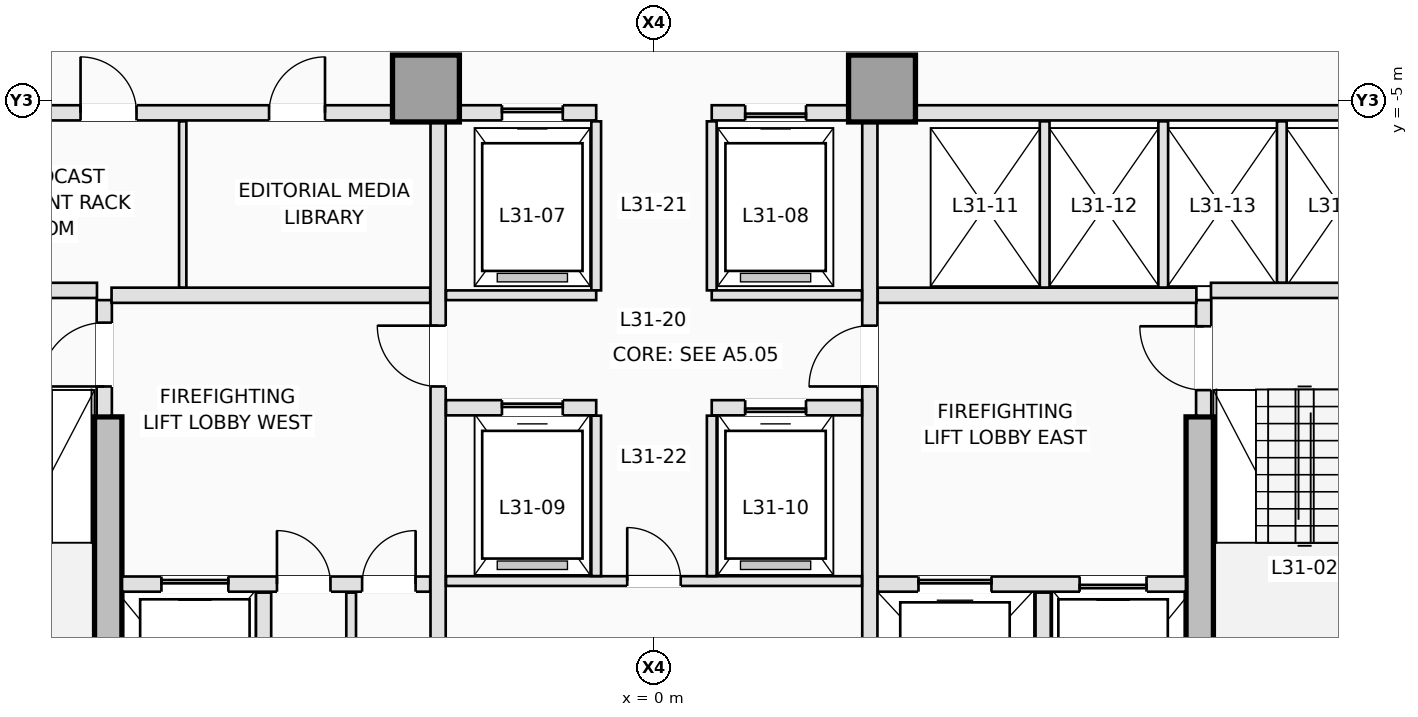
"""IFC4 building model, lengths in metres.
Left out: names, types, materials, properties, quantities, classifications, styles, units other than length and angle.
Written with IfcOpenShell. Run it as: python <this file> out.ifc"""

import sys

from ifc_helpers import new_model, si_unit, direction, frame, frame_2d, origin, origin_2d, place, context, subcontext, project, spatial, rectangle, extrude, element, fill, save


model = new_model("IFC4")
c1 = context("Model", 3, precision=1e-05, world=origin(), true_north=direction((0.0, 1.0)))
c2 = subcontext(c1, "Body", "Model", "MODEL_VIEW")
j1 = project(units=[si_unit("LENGTHUNIT", "METRE"), si_unit("PLANEANGLEUNIT", "RADIAN")], contexts=[c1])
p1 = place(None, origin())
s1 = spatial("IfcSite", under=j1, at=p1, CompositionType="ELEMENT")
p2 = place(p1, origin())
s2 = spatial("IfcBuilding", under=s1, at=p2, CompositionType="ELEMENT")
p3 = place(p2, frame((0.0, 0.0, 116.0)))
s3 = spatial("IfcBuildingStorey", under=s2, at=p3, CompositionType="ELEMENT", Elevation=116.0)
for number, where, z_axis, x_axis in (
    (1, (-8.975, -16.15, 0.0), (0.0, 0.0, 1.0), (0.0, 1.0, 0.0)),
    (2, (8.975, -16.15, 0.0), (0.0, 0.0, 1.0), (0.0, 1.0, 0.0)),
):
    element("IfcWall", number, at=place(p3, frame(where, z_axis=z_axis, x_axis=x_axis)), inside=s3, PredefinedType="SHEAR", context=c2, shape_type="SweptSolid", body=[
        extrude(rectangle(XDim=5.95, YDim=0.45, at=frame_2d((2.975, 0.0))), origin(), (0.0, 0.0, 1.0), 3.5),
    ])
for number, where, z_axis, x_axis in (
    (3, (-3.75, -4.8, 0.0), (0.0, 0.0, 1.0), (1.0, 0.0, 0.0)),
    (4, (3.75, -4.8, 0.0), (0.0, 0.0, 1.0), (1.0, 0.0, 0.0)),
):
    element("IfcColumn", number, at=place(p3, frame(where, z_axis=z_axis, x_axis=x_axis)), inside=s3, PredefinedType="COLUMN", context=c2, shape_type="SweptSolid", body=[
        extrude(rectangle(XDim=1.1, YDim=1.1, at=origin_2d()), origin(), (0.0, 0.0, 1.0), 3.5),
    ])
p4 = place(p3, frame((-9.04, -10.18, 0.0), z_axis=(0.0, 0.0, 1.0), x_axis=(0.0, 1.0, 0.0)))
e5 = element("IfcWall", 5, at=p4, inside=s3, PredefinedType="PARTITIONING", context=c2, shape_type="SweptSolid", body=[
    extrude(rectangle(XDim=1.9, YDim=0.25, at=frame_2d((0.95, 0.0))), origin(), (0.0, 0.0, 1.0), 3.25),
])
p5 = place(p4, frame((0.48, 0.0, 0.0)))
e6 = element("IfcOpeningElement", 6, at=p5, cuts=e5, PredefinedType="OPENING", context=c2, shape_type="SweptSolid", body=[
    extrude(rectangle(XDim=1.05, YDim=2.15, at=frame_2d((0.525, 1.075))), frame((0.0, 0.135, 0.0), z_axis=(0.0, -1.0, 0.0), x_axis=(1.0, 0.0, 0.0)), (0.0, 0.0, 1.0), 0.27),
])
p6 = place(p3, frame((9.04, -10.18, 0.0), z_axis=(0.0, 0.0, 1.0), x_axis=(0.0, 1.0, 0.0)))
e7 = element("IfcWall", 7, at=p6, inside=s3, PredefinedType="PARTITIONING", context=c2, shape_type="SweptSolid", body=[
    extrude(rectangle(XDim=1.9, YDim=0.25, at=frame_2d((0.95, 0.0))), origin(), (0.0, 0.0, 1.0), 3.25),
])
p7 = place(p6, frame((0.42, 0.0, 0.0)))
e8 = element("IfcOpeningElement", 8, at=p7, cuts=e7, PredefinedType="OPENING", context=c2, shape_type="SweptSolid", body=[
    extrude(rectangle(XDim=1.05, YDim=2.15, at=frame_2d((0.525, 1.075))), frame((0.0, 0.135, 0.0), z_axis=(0.0, -1.0, 0.0), x_axis=(1.0, 0.0, 0.0)), (0.0, 0.0, 1.0), 0.27),
])
for number, where, z_axis, x_axis in (
    (9, (-12.38, -8.12, 0.0), (0.0, 0.0, 1.0), (1.0, 0.0, 0.0)),
    (10, (9.16, -8.12, 0.0), (0.0, 0.0, 1.0), (1.0, 0.0, 0.0)),
):
    element("IfcWall", number, at=place(p3, frame(where, z_axis=z_axis, x_axis=x_axis)), inside=s3, PredefinedType="PARTITIONING", context=c2, shape_type="SweptSolid", body=[
        extrude(rectangle(XDim=3.22, YDim=0.25, at=frame_2d((1.61, 0.0))), origin(), (0.0, 0.0, 1.0), 3.25),
    ])
p8 = place(p3, frame((-8.748, -12.95, 0.0), z_axis=(0.0, 0.0, 1.0), x_axis=(1.0, 0.0, 0.0)))
e11 = element("IfcWall", 11, at=p8, inside=s3, PredefinedType="PARTITIONING", context=c2, shape_type="SweptSolid", body=[
    extrude(rectangle(XDim=5.068, YDim=0.25, at=frame_2d((2.534, 0.0))), origin(), (0.0, 0.0, 1.0), 3.25),
])
p9 = place(p8, frame((0.648, 0.0, 0.0)))
e12 = element("IfcOpeningElement", 12, at=p9, cuts=e11, PredefinedType="OPENING", context=c2, shape_type="SweptSolid", body=[
    extrude(rectangle(XDim=1.1, YDim=2.15, at=frame_2d((0.55, 1.075))), frame((0.0, 0.135, 0.0), z_axis=(0.0, -1.0, 0.0), x_axis=(1.0, 0.0, 0.0)), (0.0, 0.0, 1.0), 0.27),
])
p10 = place(p8, frame((2.548, 0.0, 0.0)))
e13 = element("IfcOpeningElement", 13, at=p10, cuts=e11, PredefinedType="OPENING", context=c2, shape_type="SweptSolid", body=[
    extrude(rectangle(XDim=0.88, YDim=2.1, at=frame_2d((0.44, 1.05))), frame((0.0, 0.135, 0.0), z_axis=(0.0, -1.0, 0.0), x_axis=(1.0, 0.0, 0.0)), (0.0, 0.0, 1.0), 0.27),
])
p11 = place(p8, frame((3.948, 0.0, 0.0)))
e14 = element("IfcOpeningElement", 14, at=p11, cuts=e11, PredefinedType="OPENING", context=c2, shape_type="SweptSolid", body=[
    extrude(rectangle(XDim=0.88, YDim=2.1, at=frame_2d((0.44, 1.05))), frame((0.0, 0.135, 0.0), z_axis=(0.0, -1.0, 0.0), x_axis=(1.0, 0.0, 0.0)), (0.0, 0.0, 1.0), 0.27),
])
p12 = place(p3, frame((3.68, -12.95, 0.0), z_axis=(0.0, 0.0, 1.0), x_axis=(1.0, 0.0, 0.0)))
e15 = element("IfcWall", 15, at=p12, inside=s3, PredefinedType="PARTITIONING", context=c2, shape_type="SweptSolid", body=[
    extrude(rectangle(XDim=5.068, YDim=0.25, at=frame_2d((2.534, 0.0))), origin(), (0.0, 0.0, 1.0), 3.25),
])
p13 = place(p12, frame((3.32, 0.0, 0.0)))
e16 = element("IfcOpeningElement", 16, at=p13, cuts=e15, PredefinedType="OPENING", context=c2, shape_type="SweptSolid", body=[
    extrude(rectangle(XDim=1.1, YDim=2.15, at=frame_2d((0.55, 1.075))), frame((0.0, 0.135, 0.0), z_axis=(0.0, -1.0, 0.0), x_axis=(1.0, 0.0, 0.0)), (0.0, 0.0, 1.0), 0.27),
])
p14 = place(p12, frame((0.67, 0.0, 0.0)))
e17 = element("IfcOpeningElement", 17, at=p14, cuts=e15, PredefinedType="OPENING", context=c2, shape_type="SweptSolid", body=[
    extrude(rectangle(XDim=1.2, YDim=2.15, at=frame_2d((0.6, 1.075))), frame((0.0, 0.135, 0.0), z_axis=(0.0, -1.0, 0.0), x_axis=(1.0, 0.0, 0.0)), (0.0, 0.0, 1.0), 0.27),
])
p15 = place(p3, frame((-6.42, -15.92, 0.0), z_axis=(0.0, 0.0, 1.0), x_axis=(0.0, 1.0, 0.0)))
e18 = element("IfcWall", 18, at=p15, inside=s3, PredefinedType="PARTITIONING", context=c2, shape_type="SweptSolid", body=[
    extrude(rectangle(XDim=2.83, YDim=0.25, at=frame_2d((1.415, 0.0))), origin(), (0.0, 0.0, 1.0), 3.25),
])
p16 = place(p3, frame((-4.98, -15.92, 0.0), z_axis=(0.0, 0.0, 1.0), x_axis=(0.0, 1.0, 0.0)))
e19 = element("IfcWall", 19, at=p16, inside=s3, PredefinedType="PARTITIONING", context=c2, shape_type="SweptSolid", body=[
    extrude(rectangle(XDim=2.83, YDim=0.16, at=frame_2d((1.415, 0.0))), origin(), (0.0, 0.0, 1.0), 3.25),
])
p17 = place(p3, frame((6.4, -15.92, 0.0), z_axis=(0.0, 0.0, 1.0), x_axis=(0.0, 1.0, 0.0)))
e20 = element("IfcWall", 20, at=p17, inside=s3, PredefinedType="PARTITIONING", context=c2, shape_type="SweptSolid", body=[
    extrude(rectangle(XDim=2.83, YDim=0.25, at=frame_2d((1.415, 0.0))), origin(), (0.0, 0.0, 1.0), 3.25),
])
for number, where, z_axis, x_axis in (
    (21, (-8.92, -8.2, 0.0), (0.0, 0.0, 1.0), (1.0, 0.0, 0.0)),
    (22, (3.68, -8.2, 0.0), (0.0, 0.0, 1.0), (1.0, 0.0, 0.0)),
):
    element("IfcWall", number, at=place(p3, frame(where, z_axis=z_axis, x_axis=x_axis)), inside=s3, PredefinedType="PARTITIONING", context=c2, shape_type="SweptSolid", body=[
        extrude(rectangle(XDim=5.24, YDim=0.25, at=frame_2d((2.62, 0.0))), origin(), (0.0, 0.0, 1.0), 3.25),
    ])
p18 = place(p3, frame((-3.55, -15.798, 0.0), z_axis=(0.0, 0.0, 1.0), x_axis=(0.0, 1.0, 0.0)))
e23 = element("IfcWall", 23, at=p18, inside=s3, PredefinedType="PARTITIONING", context=c2, shape_type="SweptSolid", body=[
    extrude(rectangle(XDim=10.446, YDim=0.25, at=frame_2d((5.223, 0.0))), origin(), (0.0, 0.0, 1.0), 3.25),
])
p19 = place(p18, frame((6.098, 0.0, 0.0)))
e24 = element("IfcOpeningElement", 24, at=p19, cuts=e23, PredefinedType="OPENING", context=c2, shape_type="SweptSolid", body=[
    extrude(rectangle(XDim=1.0, YDim=2.15, at=frame_2d((0.5, 1.075))), frame((0.0, 0.135, 0.0), z_axis=(0.0, -1.0, 0.0), x_axis=(1.0, 0.0, 0.0)), (0.0, 0.0, 1.0), 0.27),
])
p20 = place(p3, frame((3.55, -15.798, 0.0), z_axis=(0.0, 0.0, 1.0), x_axis=(0.0, 1.0, 0.0)))
e25 = element("IfcWall", 25, at=p20, inside=s3, PredefinedType="PARTITIONING", context=c2, shape_type="SweptSolid", body=[
    extrude(rectangle(XDim=10.446, YDim=0.25, at=frame_2d((5.223, 0.0))), origin(), (0.0, 0.0, 1.0), 3.25),
])
p21 = place(p20, frame((6.098, 0.0, 0.0)))
e26 = element("IfcOpeningElement", 26, at=p21, cuts=e25, PredefinedType="OPENING", context=c2, shape_type="SweptSolid", body=[
    extrude(rectangle(XDim=1.0, YDim=2.15, at=frame_2d((0.5, 1.075))), frame((0.0, 0.135, 0.0), z_axis=(0.0, -1.0, 0.0), x_axis=(1.0, 0.0, 0.0)), (0.0, 0.0, 1.0), 0.27),
])
p22 = place(p3, frame((-12.398, -5.2, 0.0), z_axis=(0.0, 0.0, 1.0), x_axis=(1.0, 0.0, 0.0)))
e27 = element("IfcWall", 27, at=p22, inside=s3, PredefinedType="PARTITIONING", context=c2, shape_type="SweptSolid", body=[
    extrude(rectangle(XDim=8.096, YDim=0.25, at=frame_2d((4.048, 0.0))), origin(), (0.0, 0.0, 1.0), 3.25),
])
p23 = place(p22, frame((2.968, 0.0, 0.0)))
e28 = element("IfcOpeningElement", 28, at=p23, cuts=e27, PredefinedType="OPENING", context=c2, shape_type="SweptSolid", body=[
    extrude(rectangle(XDim=0.92, YDim=2.12, at=frame_2d((0.46, 1.06))), frame((0.0, 0.135, 0.0), z_axis=(0.0, -1.0, 0.0), x_axis=(1.0, 0.0, 0.0)), (0.0, 0.0, 1.0), 0.27),
])
p24 = place(p22, frame((6.068, 0.0, 0.0)))
e29 = element("IfcOpeningElement", 29, at=p24, cuts=e27, PredefinedType="OPENING", context=c2, shape_type="SweptSolid", body=[
    extrude(rectangle(XDim=0.92, YDim=2.12, at=frame_2d((0.46, 1.06))), frame((0.0, 0.135, 0.0), z_axis=(0.0, -1.0, 0.0), x_axis=(1.0, 0.0, 0.0)), (0.0, 0.0, 1.0), 0.27),
])
p25 = place(p3, frame((4.302, -5.2, 0.0), z_axis=(0.0, 0.0, 1.0), x_axis=(1.0, 0.0, 0.0)))
e30 = element("IfcWall", 30, at=p25, inside=s3, PredefinedType="PARTITIONING", context=c2, shape_type="SweptSolid", body=[
    extrude(rectangle(XDim=8.096, YDim=0.25, at=frame_2d((4.048, 0.0))), origin(), (0.0, 0.0, 1.0), 3.25),
])
p26 = place(p3, frame((-3.198, -5.2, 0.0), z_axis=(0.0, 0.0, 1.0), x_axis=(1.0, 0.0, 0.0)))
e31 = element("IfcWall", 31, at=p26, inside=s3, PredefinedType="PARTITIONING", context=c2, shape_type="SweptSolid", body=[
    extrude(rectangle(XDim=2.248, YDim=0.25, at=frame_2d((1.124, 0.0))), origin(), (0.0, 0.0, 1.0), 3.25),
])
p27 = place(p26, frame((0.698, 0.0, 0.0)))
e32 = element("IfcOpeningElement", 32, at=p27, cuts=e31, PredefinedType="OPENING", context=c2, shape_type="SweptSolid", body=[
    extrude(rectangle(XDim=1.0, YDim=2.15, at=frame_2d((0.5, 1.075))), frame((0.0, 0.135, 0.0), z_axis=(0.0, -1.0, 0.0), x_axis=(1.0, 0.0, 0.0)), (0.0, 0.0, 1.0), 0.27),
])
p28 = place(p3, frame((0.95, -5.2, 0.0), z_axis=(0.0, 0.0, 1.0), x_axis=(1.0, 0.0, 0.0)))
e33 = element("IfcWall", 33, at=p28, inside=s3, PredefinedType="PARTITIONING", context=c2, shape_type="SweptSolid", body=[
    extrude(rectangle(XDim=2.248, YDim=0.25, at=frame_2d((1.124, 0.0))), origin(), (0.0, 0.0, 1.0), 3.25),
])
p29 = place(p28, frame((0.55, 0.0, 0.0)))
e34 = element("IfcOpeningElement", 34, at=p29, cuts=e33, PredefinedType="OPENING", context=c2, shape_type="SweptSolid", body=[
    extrude(rectangle(XDim=1.0, YDim=2.15, at=frame_2d((0.5, 1.075))), frame((0.0, 0.135, 0.0), z_axis=(0.0, -1.0, 0.0), x_axis=(1.0, 0.0, 0.0)), (0.0, 0.0, 1.0), 0.27),
])
p30 = place(p3, frame((-7.75, -8.073, 0.0), z_axis=(0.0, 0.0, 1.0), x_axis=(0.0, 1.0, 0.0)))
e35 = element("IfcWall", 35, at=p30, inside=s3, PredefinedType="PARTITIONING", context=c2, shape_type="SweptSolid", body=[
    extrude(rectangle(XDim=2.733, YDim=0.12, at=frame_2d((1.366, 0.0))), origin(), (0.0, 0.0, 1.0), 3.25),
])
for number, where, z_axis, x_axis in (
    (36, (6.425, -8.073, 0.0), (0.0, 0.0, 1.0), (0.0, 1.0, 0.0)),
    (37, (8.375, -8.073, 0.0), (0.0, 0.0, 1.0), (0.0, 1.0, 0.0)),
):
    element("IfcWall", number, at=place(p3, frame(where, z_axis=z_axis, x_axis=x_axis)), inside=s3, PredefinedType="PARTITIONING", context=c2, shape_type="SweptSolid", body=[
        extrude(rectangle(XDim=2.733, YDim=0.16, at=frame_2d((1.366, 0.0))), origin(), (0.0, 0.0, 1.0), 3.25),
    ])
p31 = place(p3, frame((10.325, -7.993, 0.0), z_axis=(0.0, 0.0, 1.0), x_axis=(0.0, 1.0, 0.0)))
e38 = element("IfcWall", 38, at=p31, inside=s3, PredefinedType="PARTITIONING", context=c2, shape_type="SweptSolid", body=[
    extrude(rectangle(XDim=2.653, YDim=0.16, at=frame_2d((1.326, 0.0))), origin(), (0.0, 0.0, 1.0), 3.25),
])
for number, where, z_axis, x_axis in (
    (39, (-0.95, -8.12, 0.0), (0.0, 0.0, 1.0), (0.0, 1.0, 0.0)),
    (40, (0.95, -8.12, 0.0), (0.0, 0.0, 1.0), (0.0, 1.0, 0.0)),
):
    element("IfcWall", number, at=place(p3, frame(where, z_axis=z_axis, x_axis=x_axis)), inside=s3, PredefinedType="PARTITIONING", context=c2, shape_type="SweptSolid", body=[
        extrude(rectangle(XDim=2.78, YDim=0.16, at=frame_2d((1.39, 0.0))), origin(), (0.0, 0.0, 1.0), 3.25),
    ])
for number, where, z_axis, x_axis in (
    (41, (-3.42, -8.2, 0.0), (0.0, 0.0, 1.0), (1.0, 0.0, 0.0)),
    (42, (0.95, -8.2, 0.0), (0.0, 0.0, 1.0), (1.0, 0.0, 0.0)),
):
    element("IfcWall", number, at=place(p3, frame(where, z_axis=z_axis, x_axis=x_axis)), inside=s3, PredefinedType="PARTITIONING", context=c2, shape_type="SweptSolid", body=[
        extrude(rectangle(XDim=2.47, YDim=0.16, at=frame_2d((1.235, 0.0))), origin(), (0.0, 0.0, 1.0), 3.25),
    ])
p32 = place(p3, frame((-3.42, -10.05, 0.0), z_axis=(0.0, 0.0, 1.0), x_axis=(1.0, 0.0, 0.0)))
e43 = element("IfcWall", 43, at=p32, inside=s3, PredefinedType="PARTITIONING", context=c2, shape_type="SweptSolid", body=[
    extrude(rectangle(XDim=2.47, YDim=0.25, at=frame_2d((1.235, 0.0))), origin(), (0.0, 0.0, 1.0), 3.25),
])
p33 = place(p32, frame((0.92, 0.0, 0.0)))
e44 = element("IfcOpeningElement", 44, at=p33, cuts=e43, PredefinedType="OPENING", context=c2, shape_type="SweptSolid", body=[
    extrude(rectangle(XDim=1.0, YDim=2.15, at=frame_2d((0.5, 1.075))), frame((0.0, 0.135, 0.0), z_axis=(0.0, -1.0, 0.0), x_axis=(1.0, 0.0, 0.0)), (0.0, 0.0, 1.0), 0.27),
])
p34 = place(p3, frame((0.95, -10.05, 0.0), z_axis=(0.0, 0.0, 1.0), x_axis=(1.0, 0.0, 0.0)))
e45 = element("IfcWall", 45, at=p34, inside=s3, PredefinedType="PARTITIONING", context=c2, shape_type="SweptSolid", body=[
    extrude(rectangle(XDim=2.47, YDim=0.25, at=frame_2d((1.235, 0.0))), origin(), (0.0, 0.0, 1.0), 3.25),
])
p35 = place(p34, frame((0.55, 0.0, 0.0)))
e46 = element("IfcOpeningElement", 46, at=p35, cuts=e45, PredefinedType="OPENING", context=c2, shape_type="SweptSolid", body=[
    extrude(rectangle(XDim=1.0, YDim=2.15, at=frame_2d((0.5, 1.075))), frame((0.0, 0.135, 0.0), z_axis=(0.0, -1.0, 0.0), x_axis=(1.0, 0.0, 0.0)), (0.0, 0.0, 1.0), 0.27),
])
p36 = place(p3, frame((-3.42, -12.9, 0.0), z_axis=(0.0, 0.0, 1.0), x_axis=(1.0, 0.0, 0.0)))
e47 = element("IfcWall", 47, at=p36, inside=s3, PredefinedType="PARTITIONING", context=c2, shape_type="SweptSolid", body=[
    extrude(rectangle(XDim=6.84, YDim=0.16, at=frame_2d((3.42, 0.0))), origin(), (0.0, 0.0, 1.0), 3.25),
])
p37 = place(p36, frame((2.98, 0.0, 0.0)))
e48 = element("IfcOpeningElement", 48, at=p37, cuts=e47, PredefinedType="OPENING", context=c2, shape_type="SweptSolid", body=[
    extrude(rectangle(XDim=0.88, YDim=2.12, at=frame_2d((0.44, 1.06))), frame((0.0, 0.09, 0.0), z_axis=(0.0, -1.0, 0.0), x_axis=(1.0, 0.0, 0.0)), (0.0, 0.0, 1.0), 0.18),
])
for number, where, z_axis, x_axis in (
    (49, (-0.95, -12.818, 0.0), (0.0, 0.0, 1.0), (0.0, 1.0, 0.0)),
    (50, (0.95, -12.818, 0.0), (0.0, 0.0, 1.0), (0.0, 1.0, 0.0)),
):
    element("IfcWall", number, at=place(p3, frame(where, z_axis=z_axis, x_axis=x_axis)), inside=s3, PredefinedType="PARTITIONING", context=c2, shape_type="SweptSolid", body=[
        extrude(rectangle(XDim=2.638, YDim=0.16, at=frame_2d((1.319, 0.0))), origin(), (0.0, 0.0, 1.0), 3.25),
    ])
p38 = place(p27, origin())
e51 = element("IfcDoor", 51, at=p38, inside=s3, OperationType="SLIDING_TO_LEFT", PredefinedType="DOOR", context=c2, shape_type="SweptSolid", body=[
    extrude(rectangle(XDim=1.0, YDim=2.15, at=frame_2d((0.5, 1.075))), frame((0.0, 0.025, 0.0), z_axis=(0.0, -1.0, 0.0), x_axis=(1.0, 0.0, 0.0)), (0.0, 0.0, 1.0), 0.05),
])
fill(e32, e51)
p39 = place(p29, origin())
e52 = element("IfcDoor", 52, at=p39, inside=s3, OperationType="SLIDING_TO_RIGHT", PredefinedType="DOOR", context=c2, shape_type="SweptSolid", body=[
    extrude(rectangle(XDim=1.0, YDim=2.15, at=frame_2d((0.5, 1.075))), frame((0.0, 0.025, 0.0), z_axis=(0.0, -1.0, 0.0), x_axis=(1.0, 0.0, 0.0)), (0.0, 0.0, 1.0), 0.05),
])
fill(e34, e52)
p40 = place(p9, origin())
e53 = element("IfcDoor", 53, at=p40, inside=s3, OperationType="SLIDING_TO_LEFT", PredefinedType="DOOR", context=c2, shape_type="SweptSolid", body=[
    extrude(rectangle(XDim=1.1, YDim=2.15, at=frame_2d((0.55, 1.075))), frame((0.0, 0.025, 0.0), z_axis=(0.0, -1.0, 0.0), x_axis=(1.0, 0.0, 0.0)), (0.0, 0.0, 1.0), 0.05),
])
fill(e12, e53)
p41 = place(p13, origin())
e54 = element("IfcDoor", 54, at=p41, inside=s3, OperationType="SLIDING_TO_RIGHT", PredefinedType="DOOR", context=c2, shape_type="SweptSolid", body=[
    extrude(rectangle(XDim=1.1, YDim=2.15, at=frame_2d((0.55, 1.075))), frame((0.0, 0.025, 0.0), z_axis=(0.0, -1.0, 0.0), x_axis=(1.0, 0.0, 0.0)), (0.0, 0.0, 1.0), 0.05),
])
fill(e16, e54)
p42 = place(p14, origin())
e55 = element("IfcDoor", 55, at=p42, inside=s3, OperationType="SLIDING_TO_LEFT", PredefinedType="DOOR", context=c2, shape_type="SweptSolid", body=[
    extrude(rectangle(XDim=1.2, YDim=2.15, at=frame_2d((0.6, 1.075))), frame((0.0, 0.025, 0.0), z_axis=(0.0, -1.0, 0.0), x_axis=(1.0, 0.0, 0.0)), (0.0, 0.0, 1.0), 0.05),
])
fill(e17, e55)
p43 = place(p33, origin())
e56 = element("IfcDoor", 56, at=p43, inside=s3, OperationType="SLIDING_TO_LEFT", PredefinedType="DOOR", context=c2, shape_type="SweptSolid", body=[
    extrude(rectangle(XDim=1.0, YDim=2.15, at=frame_2d((0.5, 1.075))), frame((0.0, 0.025, 0.0), z_axis=(0.0, -1.0, 0.0), x_axis=(1.0, 0.0, 0.0)), (0.0, 0.0, 1.0), 0.05),
])
fill(e44, e56)
p44 = place(p35, origin())
e57 = element("IfcDoor", 57, at=p44, inside=s3, OperationType="SLIDING_TO_RIGHT", PredefinedType="DOOR", context=c2, shape_type="SweptSolid", body=[
    extrude(rectangle(XDim=1.0, YDim=2.15, at=frame_2d((0.5, 1.075))), frame((0.0, 0.025, 0.0), z_axis=(0.0, -1.0, 0.0), x_axis=(1.0, 0.0, 0.0)), (0.0, 0.0, 1.0), 0.05),
])
fill(e46, e57)
p45 = place(p5, origin())
e58 = element("IfcDoor", 58, at=p45, inside=s3, OperationType="SINGLE_SWING_LEFT", PredefinedType="DOOR", context=c2, shape_type="SweptSolid", body=[
    extrude(rectangle(XDim=1.05, YDim=2.15, at=frame_2d((0.525, 1.075))), frame((0.0, 0.025, 0.0), z_axis=(0.0, -1.0, 0.0), x_axis=(1.0, 0.0, 0.0)), (0.0, 0.0, 1.0), 0.05),
])
fill(e6, e58)
p46 = place(p7, origin())
e59 = element("IfcDoor", 59, at=p46, inside=s3, OperationType="SINGLE_SWING_RIGHT", PredefinedType="DOOR", context=c2, shape_type="SweptSolid", body=[
    extrude(rectangle(XDim=1.05, YDim=2.15, at=frame_2d((0.525, 1.075))), frame((0.0, 0.025, 0.0), z_axis=(0.0, -1.0, 0.0), x_axis=(1.0, 0.0, 0.0)), (0.0, 0.0, 1.0), 0.05),
])
fill(e8, e59)
p47 = place(p10, origin())
e60 = element("IfcDoor", 60, at=p47, inside=s3, OperationType="SINGLE_SWING_LEFT", PredefinedType="TRAPDOOR", context=c2, shape_type="SweptSolid", body=[
    extrude(rectangle(XDim=0.88, YDim=2.1, at=frame_2d((0.44, 1.05))), frame((0.0, 0.025, 0.0), z_axis=(0.0, -1.0, 0.0), x_axis=(1.0, 0.0, 0.0)), (0.0, 0.0, 1.0), 0.05),
])
fill(e13, e60)
p48 = place(p11, origin())
e61 = element("IfcDoor", 61, at=p48, inside=s3, OperationType="SINGLE_SWING_RIGHT", PredefinedType="TRAPDOOR", context=c2, shape_type="SweptSolid", body=[
    extrude(rectangle(XDim=0.88, YDim=2.1, at=frame_2d((0.44, 1.05))), frame((0.0, 0.025, 0.0), z_axis=(0.0, -1.0, 0.0), x_axis=(1.0, 0.0, 0.0)), (0.0, 0.0, 1.0), 0.05),
])
fill(e14, e61)
p49 = place(p19, origin())
e62 = element("IfcDoor", 62, at=p49, inside=s3, OperationType="SINGLE_SWING_RIGHT", PredefinedType="DOOR", context=c2, shape_type="SweptSolid", body=[
    extrude(rectangle(XDim=1.0, YDim=2.15, at=frame_2d((0.5, 1.075))), frame((0.0, 0.025, 0.0), z_axis=(0.0, -1.0, 0.0), x_axis=(1.0, 0.0, 0.0)), (0.0, 0.0, 1.0), 0.05),
])
fill(e24, e62)
p50 = place(p21, origin())
e63 = element("IfcDoor", 63, at=p50, inside=s3, OperationType="SINGLE_SWING_LEFT", PredefinedType="DOOR", context=c2, shape_type="SweptSolid", body=[
    extrude(rectangle(XDim=1.0, YDim=2.15, at=frame_2d((0.5, 1.075))), frame((0.0, 0.025, 0.0), z_axis=(0.0, -1.0, 0.0), x_axis=(1.0, 0.0, 0.0)), (0.0, 0.0, 1.0), 0.05),
])
fill(e26, e63)
p51 = place(p23, origin())
e64 = element("IfcDoor", 64, at=p51, inside=s3, OperationType="SINGLE_SWING_LEFT", PredefinedType="DOOR", context=c2, shape_type="SweptSolid", body=[
    extrude(rectangle(XDim=0.92, YDim=2.12, at=frame_2d((0.46, 1.06))), frame((0.0, 0.025, 0.0), z_axis=(0.0, -1.0, 0.0), x_axis=(1.0, 0.0, 0.0)), (0.0, 0.0, 1.0), 0.05),
])
fill(e28, e64)
p52 = place(p24, origin())
e65 = element("IfcDoor", 65, at=p52, inside=s3, OperationType="SINGLE_SWING_RIGHT", PredefinedType="DOOR", context=c2, shape_type="SweptSolid", body=[
    extrude(rectangle(XDim=0.92, YDim=2.12, at=frame_2d((0.46, 1.06))), frame((0.0, 0.025, 0.0), z_axis=(0.0, -1.0, 0.0), x_axis=(1.0, 0.0, 0.0)), (0.0, 0.0, 1.0), 0.05),
])
fill(e29, e65)
p53 = place(p37, origin())
e66 = element("IfcDoor", 66, at=p53, inside=s3, OperationType="SINGLE_SWING_LEFT", PredefinedType="DOOR", context=c2, shape_type="SweptSolid", body=[
    extrude(rectangle(XDim=0.88, YDim=2.12, at=frame_2d((0.44, 1.06))), frame((0.0, 0.025, 0.0), z_axis=(0.0, -1.0, 0.0), x_axis=(1.0, 0.0, 0.0)), (0.0, 0.0, 1.0), 0.05),
])
fill(e48, e66)
save(model, sys.argv[1])
